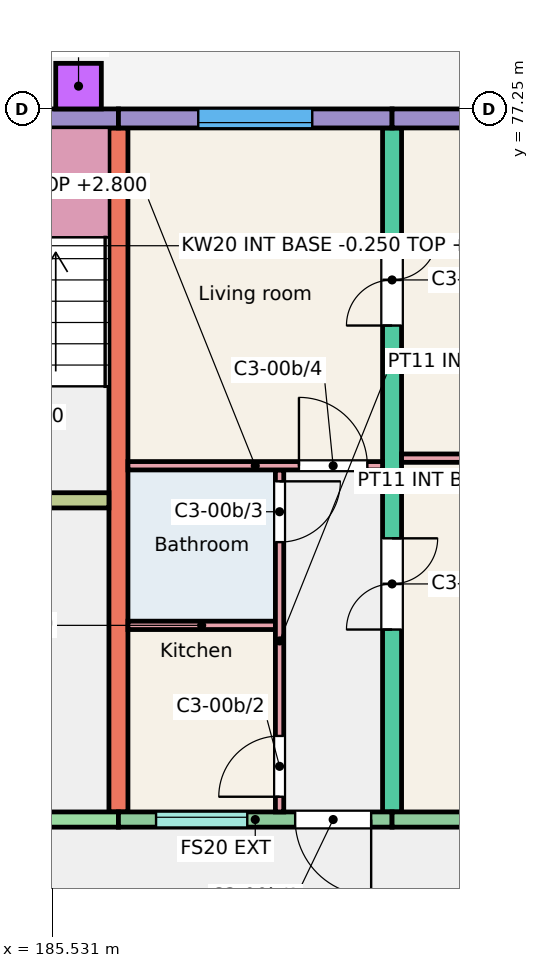
"""IFC4 building model, lengths in metres.
Left out: names, types, materials, properties, quantities, classifications, styles, units other than length and angle.
Written with IfcOpenShell. Run it as: python <this file> out.ifc"""

import sys

from ifc_helpers import new_model, si_unit, direction, frame, frame_2d, origin, origin_2d, place, context, subcontext, project, spatial, rectangle, extrude, element, fill, save


model = new_model("IFC4")
c1 = context("Model", 3, precision=1e-05, world=origin(), true_north=direction((0.0, 1.0)))
c2 = subcontext(c1, "Body", "Model", "MODEL_VIEW")
j1 = project(units=[si_unit("LENGTHUNIT", "METRE"), si_unit("PLANEANGLEUNIT", "RADIAN")], contexts=[c1])
p1 = place(None, origin())
s1 = spatial("IfcSite", under=j1, at=p1, CompositionType="ELEMENT")
p2 = place(p1, origin())
s2 = spatial("IfcBuilding", under=s1, at=p2, CompositionType="ELEMENT")
p3 = place(p2, origin())
s3 = spatial("IfcBuildingStorey", under=s2, at=p3, CompositionType="ELEMENT", Elevation=0.0)
p4 = place(p3, frame((186.4, 68.0, -0.25), z_axis=(0.0, 0.0, 1.0), x_axis=(0.0, 1.0, 0.0)))
e1 = element("IfcWall", 1, at=p4, inside=s3, PredefinedType="SHEAR", context=c2, shape_type="SweptSolid", body=[
    extrude(rectangle(XDim=9.0, YDim=0.25, at=frame_2d((4.5, 0.0))), origin(), (0.0, 0.0, 1.0), 3.25),
])
p5 = place(p3, frame((190.0, 68.0, -0.25), z_axis=(0.0, 0.0, 1.0), x_axis=(0.0, 1.0, 0.0)))
e2 = element("IfcWall", 2, at=p5, inside=s3, PredefinedType="SHEAR", context=c2, shape_type="SweptSolid", body=[
    extrude(rectangle(XDim=9.0, YDim=0.25, at=frame_2d((4.5, 0.0))), origin(), (0.0, 0.0, 1.0), 3.25),
])
p6 = place(p5, frame((2.4, 0.0, 0.25)))
e3 = element("IfcOpeningElement", 3, at=p6, cuts=e2, PredefinedType="OPENING", context=c2, shape_type="SweptSolid", body=[
    extrude(rectangle(XDim=1.2, YDim=2.1, at=frame_2d((0.6, 1.05))), frame((0.0, 0.135, 0.0), z_axis=(0.0, -1.0, 0.0), x_axis=(1.0, 0.0, 0.0)), (0.0, 0.0, 1.0), 0.27),
])
p7 = place(p5, frame((6.4, 0.0, 0.25)))
e4 = element("IfcOpeningElement", 4, at=p7, cuts=e2, PredefinedType="OPENING", context=c2, shape_type="SweptSolid", body=[
    extrude(rectangle(XDim=1.2, YDim=2.1, at=frame_2d((0.6, 1.05))), frame((0.0, 0.135, 0.0), z_axis=(0.0, -1.0, 0.0), x_axis=(1.0, 0.0, 0.0)), (0.0, 0.0, 1.0), 0.27),
])
p8 = place(p3, frame((180.4, 77.125, -0.25), z_axis=(0.0, 0.0, 1.0), x_axis=(1.0, 0.0, 0.0)))
e5 = element("IfcWall", 5, at=p8, inside=s3, PredefinedType="SOLIDWALL", context=c2, shape_type="SweptSolid", body=[
    extrude(rectangle(XDim=6.0, YDim=0.25, at=frame_2d((3.0, 0.0))), origin(), (0.0, 0.0, 1.0), 3.25),
])
p9 = place(p8, frame((3.875, 0.0, 0.25)))
e6 = element("IfcOpeningElement", 6, at=p9, cuts=e5, PredefinedType="OPENING", context=c2, shape_type="SweptSolid", body=[
    extrude(rectangle(XDim=1.1, YDim=2.1, at=frame_2d((0.55, 1.05))), frame((0.0, 0.135, 0.0), z_axis=(0.0, -1.0, 0.0), x_axis=(1.0, 0.0, 0.0)), (0.0, 0.0, 1.0), 0.27),
])
p10 = place(p3, frame((180.55, 67.9, -0.25), z_axis=(0.0, 0.0, 1.0), x_axis=(1.0, 0.0, 0.0)))
e7 = element("IfcWall", 7, at=p10, inside=s3, PredefinedType="SHEAR", context=c2, shape_type="SweptSolid", body=[
    extrude(rectangle(XDim=5.85, YDim=0.2, at=frame_2d((2.925, 0.0))), origin(), (0.0, 0.0, 1.0), 3.25),
])
p11 = place(p10, frame((2.312, 0.0, 0.25)))
e8 = element("IfcOpeningElement", 8, at=p11, cuts=e7, PredefinedType="OPENING", context=c2, shape_type="SweptSolid", body=[
    extrude(rectangle(XDim=1.1, YDim=2.1, at=frame_2d((0.55, 1.05))), frame((0.0, 0.11, 0.0), z_axis=(0.0, -1.0, 0.0), x_axis=(1.0, 0.0, 0.0)), (0.0, 0.0, 1.0), 0.22),
])
p12 = place(p3, frame((180.55, 72.1, -0.25), z_axis=(0.0, 0.0, 1.0), x_axis=(1.0, 0.0, 0.0)))
e9 = element("IfcWall", 9, at=p12, inside=s3, PredefinedType="SHEAR", context=c2, shape_type="SweptSolid", body=[
    extrude(rectangle(XDim=5.725, YDim=0.2, at=frame_2d((2.862, 0.0))), origin(), (0.0, 0.0, 1.0), 3.25),
])
p13 = place(p12, frame((3.775, 0.0, 0.25)))
e10 = element("IfcOpeningElement", 10, at=p13, cuts=e9, PredefinedType="OPENING", context=c2, shape_type="SweptSolid", body=[
    extrude(rectangle(XDim=1.0, YDim=2.1, at=frame_2d((0.5, 1.05))), frame((0.0, 0.11, 0.0), z_axis=(0.0, -1.0, 0.0), x_axis=(1.0, 0.0, 0.0)), (0.0, 0.0, 1.0), 0.22),
])
p14 = place(p12, frame((0.762, 0.0, 0.25)))
e11 = element("IfcOpeningElement", 11, at=p14, cuts=e9, PredefinedType="OPENING", context=c2, shape_type="SweptSolid", body=[
    extrude(rectangle(XDim=1.1, YDim=2.1, at=frame_2d((0.55, 1.05))), frame((0.0, 0.11, 0.0), z_axis=(0.0, -1.0, 0.0), x_axis=(1.0, 0.0, 0.0)), (0.0, 0.0, 1.0), 0.22),
])
p15 = place(p3, frame((186.4, 77.125, -0.25), z_axis=(0.0, 0.0, 1.0), x_axis=(1.0, 0.0, 0.0)))
e12 = element("IfcWall", 12, at=p15, inside=s3, PredefinedType="SOLIDWALL", context=c2, shape_type="SweptSolid", body=[
    extrude(rectangle(XDim=3.6, YDim=0.25, at=frame_2d((1.8, 0.0))), origin(), (0.0, 0.0, 1.0), 3.25),
])
p16 = place(p15, frame((1.05, 0.0, 1.15)))
e13 = element("IfcOpeningElement", 13, at=p16, cuts=e12, PredefinedType="OPENING", context=c2, shape_type="SweptSolid", body=[
    extrude(rectangle(XDim=1.5, YDim=1.5, at=frame_2d((0.75, 0.75))), frame((0.0, 0.135, 0.0), z_axis=(0.0, -1.0, 0.0), x_axis=(1.0, 0.0, 0.0)), (0.0, 0.0, 1.0), 0.27),
])
p17 = place(p3, frame((186.4, 67.9, -0.25), z_axis=(0.0, 0.0, 1.0), x_axis=(1.0, 0.0, 0.0)))
e14 = element("IfcWall", 14, at=p17, inside=s3, PredefinedType="SOLIDWALL", context=c2, shape_type="SweptSolid", body=[
    extrude(rectangle(XDim=3.6, YDim=0.2, at=frame_2d((1.8, 0.0))), origin(), (0.0, 0.0, 1.0), 3.25),
])
p18 = place(p17, frame((0.495, 0.0, 1.35)))
e15 = element("IfcOpeningElement", 15, at=p18, cuts=e14, PredefinedType="OPENING", context=c2, shape_type="SweptSolid", body=[
    extrude(rectangle(XDim=1.2, YDim=1.3, at=frame_2d((0.6, 0.65))), frame((0.0, 0.11, 0.0), z_axis=(0.0, -1.0, 0.0), x_axis=(1.0, 0.0, 0.0)), (0.0, 0.0, 1.0), 0.22),
])
p19 = place(p17, frame((2.325, 0.0, 0.25)))
e16 = element("IfcOpeningElement", 16, at=p19, cuts=e14, PredefinedType="OPENING", context=c2, shape_type="SweptSolid", body=[
    extrude(rectangle(XDim=1.0, YDim=2.1, at=frame_2d((0.5, 1.05))), frame((0.0, 0.11, 0.0), z_axis=(0.0, -1.0, 0.0), x_axis=(1.0, 0.0, 0.0)), (0.0, 0.0, 1.0), 0.22),
])
p20 = place(p3, frame((190.0, 77.125, -0.25), z_axis=(0.0, 0.0, 1.0), x_axis=(1.0, 0.0, 0.0)))
e17 = element("IfcWall", 17, at=p20, inside=s3, PredefinedType="SOLIDWALL", context=c2, shape_type="SweptSolid", body=[
    extrude(rectangle(XDim=3.6, YDim=0.25, at=frame_2d((1.8, 0.0))), origin(), (0.0, 0.0, 1.0), 3.25),
])
p21 = place(p20, frame((1.05, 0.0, 1.15)))
e18 = element("IfcOpeningElement", 18, at=p21, cuts=e17, PredefinedType="OPENING", context=c2, shape_type="SweptSolid", body=[
    extrude(rectangle(XDim=1.5, YDim=1.5, at=frame_2d((0.75, 0.75))), frame((0.0, 0.135, 0.0), z_axis=(0.0, -1.0, 0.0), x_axis=(1.0, 0.0, 0.0)), (0.0, 0.0, 1.0), 0.27),
])
p22 = place(p3, frame((190.0, 67.9, -0.25), z_axis=(0.0, 0.0, 1.0), x_axis=(1.0, 0.0, 0.0)))
e19 = element("IfcWall", 19, at=p22, inside=s3, PredefinedType="SOLIDWALL", context=c2, shape_type="SweptSolid", body=[
    extrude(rectangle(XDim=3.6, YDim=0.2, at=frame_2d((1.8, 0.0))), origin(), (0.0, 0.0, 1.0), 3.25),
])
p23 = place(p22, frame((1.05, 0.0, 1.15)))
e20 = element("IfcOpeningElement", 20, at=p23, cuts=e19, PredefinedType="OPENING", context=c2, shape_type="SweptSolid", body=[
    extrude(rectangle(XDim=1.5, YDim=1.5, at=frame_2d((0.75, 0.75))), frame((0.0, 0.11, 0.0), z_axis=(0.0, -1.0, 0.0), x_axis=(1.0, 0.0, 0.0)), (0.0, 0.0, 1.0), 0.22),
])
p24 = place(p3, frame((185.875, 77.55, -0.25), z_axis=(0.0, 0.0, 1.0), x_axis=(1.0, 0.0, 0.0)))
e21 = element("IfcColumn", 21, at=p24, inside=s3, PredefinedType="COLUMN", context=c2, shape_type="SweptSolid", body=[
    extrude(rectangle(XDim=0.6, YDim=0.6, at=origin_2d()), origin(), (0.0, 0.0, 1.0), 3.15),
])
p25 = place(p3, frame((186.525, 70.455, 0.0), z_axis=(0.0, 0.0, 1.0), x_axis=(1.0, 0.0, 0.0)))
e22 = element("IfcWall", 22, at=p25, inside=s3, PredefinedType="PARTITIONING", context=c2, shape_type="SweptSolid", body=[
    extrude(rectangle(XDim=1.94, YDim=0.11, at=frame_2d((0.97, 0.0))), origin(), (0.0, 0.0, 1.0), 2.8),
])
p26 = place(p3, frame((188.52, 68.0, 0.0), z_axis=(0.0, 0.0, 1.0), x_axis=(0.0, 1.0, 0.0)))
e23 = element("IfcWall", 23, at=p26, inside=s3, PredefinedType="PARTITIONING", context=c2, shape_type="SweptSolid", body=[
    extrude(rectangle(XDim=4.5, YDim=0.11, at=frame_2d((2.25, 0.0))), origin(), (0.0, 0.0, 1.0), 2.8),
])
p27 = place(p26, frame((0.2, 0.0, 0.0)))
e24 = element("IfcOpeningElement", 24, at=p27, cuts=e23, PredefinedType="OPENING", context=c2, shape_type="SweptSolid", body=[
    extrude(rectangle(XDim=0.8, YDim=2.1, at=frame_2d((0.4, 1.05))), frame((0.0, 0.065, 0.0), z_axis=(0.0, -1.0, 0.0), x_axis=(1.0, 0.0, 0.0)), (0.0, 0.0, 1.0), 0.13),
])
p28 = place(p26, frame((3.55, 0.0, 0.0)))
e25 = element("IfcOpeningElement", 25, at=p28, cuts=e23, PredefinedType="OPENING", context=c2, shape_type="SweptSolid", body=[
    extrude(rectangle(XDim=0.8, YDim=2.1, at=frame_2d((0.4, 1.05))), frame((0.0, 0.065, 0.0), z_axis=(0.0, -1.0, 0.0), x_axis=(1.0, 0.0, 0.0)), (0.0, 0.0, 1.0), 0.13),
])
p29 = place(p3, frame((186.525, 72.555, 0.0), z_axis=(0.0, 0.0, 1.0), x_axis=(1.0, 0.0, 0.0)))
e26 = element("IfcWall", 26, at=p29, inside=s3, PredefinedType="PARTITIONING", context=c2, shape_type="SweptSolid", body=[
    extrude(rectangle(XDim=3.35, YDim=0.11, at=frame_2d((1.675, 0.0))), origin(), (0.0, 0.0, 1.0), 2.8),
])
p30 = place(p29, frame((2.25, 0.0, 0.0)))
e27 = element("IfcOpeningElement", 27, at=p30, cuts=e26, PredefinedType="OPENING", context=c2, shape_type="SweptSolid", body=[
    extrude(rectangle(XDim=0.9, YDim=2.1, at=frame_2d((0.45, 1.05))), frame((0.0, 0.065, 0.0), z_axis=(0.0, -1.0, 0.0), x_axis=(1.0, 0.0, 0.0)), (0.0, 0.0, 1.0), 0.13),
])
p31 = place(p3, frame((190.125, 72.655, 0.0), z_axis=(0.0, 0.0, 1.0), x_axis=(1.0, 0.0, 0.0)))
e28 = element("IfcWall", 28, at=p31, inside=s3, PredefinedType="PARTITIONING", context=c2, shape_type="SweptSolid", body=[
    extrude(rectangle(XDim=3.35, YDim=0.11, at=frame_2d((1.675, 0.0))), origin(), (0.0, 0.0, 1.0), 2.8),
])
p32 = place(p18, origin())
e29 = element("IfcWindow", 29, at=p32, inside=s3, PartitioningType="SINGLE_PANEL", PredefinedType="WINDOW", context=c2, shape_type="SweptSolid", body=[
    extrude(rectangle(XDim=1.2, YDim=1.3, at=frame_2d((0.6, 0.65))), frame((0.0, 0.06, 0.0), z_axis=(0.0, -1.0, 0.0), x_axis=(1.0, 0.0, 0.0)), (0.0, 0.0, 1.0), 0.06),
])
fill(e15, e29)
p33 = place(p16, origin())
e30 = element("IfcWindow", 30, at=p33, inside=s3, PartitioningType="SINGLE_PANEL", PredefinedType="WINDOW", context=c2, shape_type="SweptSolid", body=[
    extrude(rectangle(XDim=1.5, YDim=1.5, at=frame_2d((0.75, 0.75))), frame((0.0, -0.025, 0.0), z_axis=(0.0, -1.0, 0.0), x_axis=(1.0, 0.0, 0.0)), (0.0, 0.0, 1.0), 0.06),
])
fill(e13, e30)
p34 = place(p19, origin())
e31 = element("IfcDoor", 31, at=p34, inside=s3, OperationType="SINGLE_SWING_RIGHT", PredefinedType="DOOR", context=c2, shape_type="SweptSolid", body=[
    extrude(rectangle(XDim=1.0, YDim=2.1, at=frame_2d((0.5, 1.05))), frame((0.0, 0.025, 0.0), z_axis=(0.0, -1.0, 0.0), x_axis=(1.0, 0.0, 0.0)), (0.0, 0.0, 1.0), 0.05),
])
fill(e16, e31)
p35 = place(p27, origin())
e32 = element("IfcDoor", 32, at=p35, inside=s3, OperationType="SINGLE_SWING_LEFT", PredefinedType="DOOR", context=c2, shape_type="SweptSolid", body=[
    extrude(rectangle(XDim=0.8, YDim=2.1, at=frame_2d((0.4, 1.05))), frame((0.0, 0.025, 0.0), z_axis=(0.0, -1.0, 0.0), x_axis=(1.0, 0.0, 0.0)), (0.0, 0.0, 1.0), 0.05),
])
fill(e24, e32)
p36 = place(p28, origin())
e33 = element("IfcDoor", 33, at=p36, inside=s3, OperationType="SINGLE_SWING_RIGHT", PredefinedType="DOOR", context=c2, shape_type="SweptSolid", body=[
    extrude(rectangle(XDim=0.8, YDim=2.1, at=frame_2d((0.4, 1.05))), frame((0.0, 0.025, 0.0), z_axis=(0.0, -1.0, 0.0), x_axis=(1.0, 0.0, 0.0)), (0.0, 0.0, 1.0), 0.05),
])
fill(e25, e33)
p37 = place(p30, origin())
e34 = element("IfcDoor", 34, at=p37, inside=s3, OperationType="SINGLE_SWING_LEFT", PredefinedType="DOOR", context=c2, shape_type="SweptSolid", body=[
    extrude(rectangle(XDim=0.9, YDim=2.1, at=frame_2d((0.45, 1.05))), frame((0.0, 0.025, 0.0), z_axis=(0.0, -1.0, 0.0), x_axis=(1.0, 0.0, 0.0)), (0.0, 0.0, 1.0), 0.05),
])
fill(e27, e34)
p38 = place(p6, origin())
e35 = element("IfcDoor", 35, at=p38, inside=s3, OperationType="DOUBLE_DOOR_SINGLE_SWING", PredefinedType="DOOR", context=c2, shape_type="SweptSolid", body=[
    extrude(rectangle(XDim=1.2, YDim=2.1, at=frame_2d((0.6, 1.05))), frame((0.0, 0.025, 0.0), z_axis=(0.0, -1.0, 0.0), x_axis=(1.0, 0.0, 0.0)), (0.0, 0.0, 1.0), 0.05),
])
fill(e3, e35)
p39 = place(p7, origin())
e36 = element("IfcDoor", 36, at=p39, inside=s3, OperationType="DOUBLE_DOOR_SINGLE_SWING", PredefinedType="DOOR", context=c2, shape_type="SweptSolid", body=[
    extrude(rectangle(XDim=1.2, YDim=2.1, at=frame_2d((0.6, 1.05))), frame((0.0, 0.025, 0.0), z_axis=(0.0, -1.0, 0.0), x_axis=(1.0, 0.0, 0.0)), (0.0, 0.0, 1.0), 0.05),
])
fill(e4, e36)
save(model, sys.argv[1])
